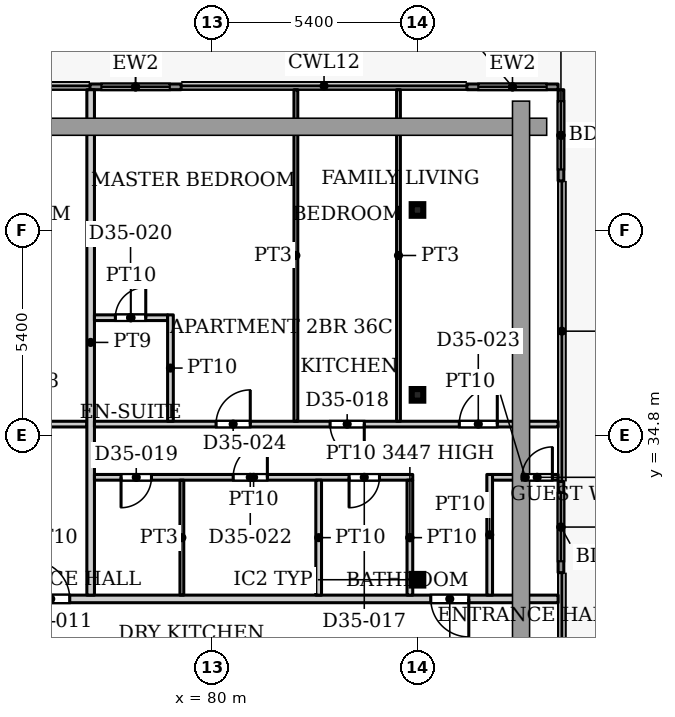
"""IFC4 building model, lengths in metres.
Left out: names, types, materials, properties, quantities, classifications, styles, units other than length and angle.
Written with IfcOpenShell. Run it as: python <this file> out.ifc"""

import sys

from ifc_helpers import new_model, si_unit, direction, frame, frame_2d, origin, origin_2d, place, context, subcontext, project, spatial, rectangle, hollow_rectangle, extrude, source, transform, mapped, element, fill, save


model = new_model("IFC4")
c1 = context("Model", 3, precision=1e-05, world=origin(), true_north=direction((0.0, 1.0)))
c2 = subcontext(c1, "Body", "Model", "MODEL_VIEW")
j1 = project(units=[si_unit("LENGTHUNIT", "METRE"), si_unit("PLANEANGLEUNIT", "RADIAN")], contexts=[c1])
p1 = place(None, origin())
s1 = spatial("IfcSite", under=j1, at=p1, CompositionType="ELEMENT")
p2 = place(p1, origin())
s2 = spatial("IfcBuilding", under=s1, at=p2, CompositionType="ELEMENT")
p3 = place(p2, frame((0.0, 0.0, 156.5)))
s3 = spatial("IfcBuildingStorey", under=s2, at=p3, CompositionType="ELEMENT", Elevation=156.5)
for number, where, z_axis, x_axis in (
    (1, (85.4, 31.005, 0.0), (0.0, 0.0, 1.0), (1.0, 0.0, 0.0)),
    (2, (85.4, 35.87, 0.0), (0.0, 0.0, 1.0), (1.0, 0.0, 0.0)),
    (3, (85.4, 40.735, 0.0), (0.0, 0.0, 1.0), (1.0, 0.0, 0.0)),
):
    element("IfcColumn", number, at=place(p3, frame(where, z_axis=z_axis, x_axis=x_axis)), inside=s3, PredefinedType="COLUMN", context=c2, shape_type="SweptSolid", body=[
        extrude(hollow_rectangle(XDim=0.305, YDim=0.305, WallThickness=0.016, InnerFilletRadius=0.016, OuterFilletRadius=0.032, at=origin_2d()), origin(), (0.0, 0.0, 1.0), 3.9),
    ])
p4 = place(p3, frame((76.782, 43.975, 0.0), z_axis=(0.0, 0.0, 1.0), x_axis=(1.0, 0.0, 0.0)))
e4 = element("IfcWall", 4, at=p4, inside=s3, PredefinedType="SOLIDWALL", context=c2, shape_type="SweptSolid", body=[
    extrude(rectangle(XDim=2.4, YDim=0.15, at=frame_2d((1.2, 0.0))), origin(), (0.0, 0.0, 1.0), 3.75),
])
p5 = place(p4, frame((0.3, 0.0, 0.0)))
e5 = element("IfcOpeningElement", 5, at=p5, cuts=e4, PredefinedType="OPENING", context=c2, shape_type="SweptSolid", body=[
    extrude(rectangle(XDim=1.8, YDim=2.4, at=frame_2d((0.9, 1.2))), frame((0.0, 0.085, 0.0), z_axis=(0.0, -1.0, 0.0), x_axis=(1.0, 0.0, 0.0)), (0.0, 0.0, 1.0), 0.17),
])
p6 = place(p3, frame((86.7, 43.975, 0.0), z_axis=(0.0, 0.0, 1.0), x_axis=(1.0, 0.0, 0.0)))
e6 = element("IfcWall", 6, at=p6, inside=s3, PredefinedType="SOLIDWALL", context=c2, shape_type="SweptSolid", body=[
    extrude(rectangle(XDim=2.4, YDim=0.15, at=frame_2d((1.2, 0.0))), origin(), (0.0, 0.0, 1.0), 3.75),
])
p7 = place(p6, frame((0.3, 0.0, 0.0)))
e7 = element("IfcOpeningElement", 7, at=p7, cuts=e6, PredefinedType="OPENING", context=c2, shape_type="SweptSolid", body=[
    extrude(rectangle(XDim=1.8, YDim=2.4, at=frame_2d((0.9, 1.2))), frame((0.0, 0.085, 0.0), z_axis=(0.0, -1.0, 0.0), x_axis=(1.0, 0.0, 0.0)), (0.0, 0.0, 1.0), 0.17),
])
p8 = place(p3, frame((89.175, 43.9, 0.0), z_axis=(0.0, 0.0, 1.0), x_axis=(0.0, -1.0, 0.0)))
e8 = element("IfcWall", 8, at=p8, inside=s3, PredefinedType="SOLIDWALL", context=c2, shape_type="SweptSolid", body=[
    extrude(rectangle(XDim=2.4, YDim=0.15, at=frame_2d((1.2, 0.0))), origin(), (0.0, 0.0, 1.0), 3.75),
])
p9 = place(p8, frame((0.3, 0.0, 0.0)))
e9 = element("IfcOpeningElement", 9, at=p9, cuts=e8, PredefinedType="OPENING", context=c2, shape_type="SweptSolid", body=[
    extrude(rectangle(XDim=1.8, YDim=2.4, at=frame_2d((0.9, 1.2))), frame((0.0, 0.085, 0.0), z_axis=(0.0, -1.0, 0.0), x_axis=(1.0, 0.0, 0.0)), (0.0, 0.0, 1.0), 0.17),
])
p10 = place(p3, frame((89.175, 33.591, 0.0), z_axis=(0.0, 0.0, 1.0), x_axis=(0.0, -1.0, 0.0)))
e10 = element("IfcWall", 10, at=p10, inside=s3, PredefinedType="SOLIDWALL", context=c2, shape_type="SweptSolid", body=[
    extrude(rectangle(XDim=2.4, YDim=0.15, at=frame_2d((1.2, 0.0))), origin(), (0.0, 0.0, 1.0), 3.75),
])
p11 = place(p10, frame((0.3, 0.0, 0.0)))
e11 = element("IfcOpeningElement", 11, at=p11, cuts=e10, PredefinedType="OPENING", context=c2, shape_type="SweptSolid", body=[
    extrude(rectangle(XDim=1.8, YDim=2.4, at=frame_2d((0.9, 1.2))), frame((0.0, 0.085, 0.0), z_axis=(0.0, -1.0, 0.0), x_axis=(1.0, 0.0, 0.0)), (0.0, 0.0, 1.0), 0.17),
])
p12 = place(p3, frame((53.549, 30.5, 0.0), z_axis=(0.0, 0.0, 1.0), x_axis=(1.0, 0.0, 0.0)))
e12 = element("IfcWall", 12, at=p12, inside=s3, PredefinedType="PARTITIONING", context=c2, shape_type="SweptSolid", body=[
    extrude(rectangle(XDim=35.551, YDim=0.2, at=frame_2d((17.775, 0.0))), origin(), (0.0, 0.0, 1.0), 3.6),
])
p13 = place(p12, frame((0.251, 0.0, 0.0)))
e13 = element("IfcOpeningElement", 13, at=p13, cuts=e12, PredefinedType="OPENING", context=c2, shape_type="SweptSolid", body=[
    extrude(rectangle(XDim=1.0, YDim=2.1, at=frame_2d((0.5, 1.05))), frame((0.0, 0.11, 0.0), z_axis=(0.0, -1.0, 0.0), x_axis=(1.0, 0.0, 0.0)), (0.0, 0.0, 1.0), 0.22),
])
p14 = place(p12, frame((21.701, 0.0, 0.0)))
e14 = element("IfcOpeningElement", 14, at=p14, cuts=e12, PredefinedType="OPENING", context=c2, shape_type="SweptSolid", body=[
    extrude(rectangle(XDim=1.0, YDim=2.1, at=frame_2d((0.5, 1.05))), frame((0.0, 0.11, 0.0), z_axis=(0.0, -1.0, 0.0), x_axis=(1.0, 0.0, 0.0)), (0.0, 0.0, 1.0), 0.22),
])
p15 = place(p12, frame((32.201, 0.0, 0.0)))
e15 = element("IfcOpeningElement", 15, at=p15, cuts=e12, PredefinedType="OPENING", context=c2, shape_type="SweptSolid", body=[
    extrude(rectangle(XDim=1.0, YDim=2.1, at=frame_2d((0.5, 1.05))), frame((0.0, 0.11, 0.0), z_axis=(0.0, -1.0, 0.0), x_axis=(1.0, 0.0, 0.0)), (0.0, 0.0, 1.0), 0.22),
])
p16 = place(p3, frame((62.8, 35.1, 0.0), z_axis=(0.0, 0.0, 1.0), x_axis=(1.0, 0.0, 0.0)))
e16 = element("IfcWall", 16, at=p16, inside=s3, PredefinedType="PARTITIONING", context=c2, shape_type="SweptSolid", body=[
    extrude(rectangle(XDim=13.9, YDim=0.15, at=frame_2d((6.95, 0.0))), origin(), (0.0, 0.0, 1.0), 3.6),
])
p17 = place(p16, frame((11.6, 0.0, 0.0)))
e17 = element("IfcOpeningElement", 17, at=p17, cuts=e16, PredefinedType="OPENING", context=c2, shape_type="SweptSolid", body=[
    extrude(rectangle(XDim=0.9, YDim=2.1, at=frame_2d((0.45, 1.05))), frame((0.0, 0.085, 0.0), z_axis=(0.0, -1.0, 0.0), x_axis=(1.0, 0.0, 0.0)), (0.0, 0.0, 1.0), 0.17),
])
p18 = place(p16, frame((1.8, 0.0, 0.0)))
e18 = element("IfcOpeningElement", 18, at=p18, cuts=e16, PredefinedType="OPENING", context=c2, shape_type="SweptSolid", body=[
    extrude(rectangle(XDim=1.0, YDim=2.1, at=frame_2d((0.5, 1.05))), frame((0.0, 0.085, 0.0), z_axis=(0.0, -1.0, 0.0), x_axis=(1.0, 0.0, 0.0)), (0.0, 0.0, 1.0), 0.17),
])
p19 = place(p16, frame((5.5, 0.0, 0.0)))
e19 = element("IfcOpeningElement", 19, at=p19, cuts=e16, PredefinedType="OPENING", context=c2, shape_type="SweptSolid", body=[
    extrude(rectangle(XDim=0.9, YDim=2.1, at=frame_2d((0.45, 1.05))), frame((0.0, 0.085, 0.0), z_axis=(0.0, -1.0, 0.0), x_axis=(1.0, 0.0, 0.0)), (0.0, 0.0, 1.0), 0.17),
])
p20 = place(p3, frame((76.8, 30.6, 0.0), z_axis=(0.0, 0.0, 1.0), x_axis=(0.0, 1.0, 0.0)))
e20 = element("IfcWall", 20, at=p20, inside=s3, PredefinedType="PARTITIONING", context=c2, shape_type="SweptSolid", body=[
    extrude(rectangle(XDim=13.3, YDim=0.2, at=frame_2d((6.65, 0.0))), origin(), (0.0, 0.0, 1.0), 3.6),
])
p21 = place(p3, frame((76.9, 33.7, 0.0), z_axis=(0.0, 0.0, 1.0), x_axis=(1.0, 0.0, 0.0)))
e21 = element("IfcWall", 21, at=p21, inside=s3, PredefinedType="PARTITIONING", context=c2, shape_type="SweptSolid", body=[
    extrude(rectangle(XDim=8.375, YDim=0.15, at=frame_2d((4.188, 0.0))), origin(), (0.0, 0.0, 1.0), 3.6),
])
p22 = place(p21, frame((6.7, 0.0, 0.0)))
e22 = element("IfcOpeningElement", 22, at=p22, cuts=e21, PredefinedType="OPENING", context=c2, shape_type="SweptSolid", body=[
    extrude(rectangle(XDim=0.8, YDim=2.1, at=frame_2d((0.4, 1.05))), frame((0.0, 0.085, 0.0), z_axis=(0.0, -1.0, 0.0), x_axis=(1.0, 0.0, 0.0)), (0.0, 0.0, 1.0), 0.17),
])
p23 = place(p21, frame((0.7, 0.0, 0.0)))
e23 = element("IfcOpeningElement", 23, at=p23, cuts=e21, PredefinedType="OPENING", context=c2, shape_type="SweptSolid", body=[
    extrude(rectangle(XDim=0.8, YDim=2.1, at=frame_2d((0.4, 1.05))), frame((0.0, 0.085, 0.0), z_axis=(0.0, -1.0, 0.0), x_axis=(1.0, 0.0, 0.0)), (0.0, 0.0, 1.0), 0.17),
])
p24 = place(p21, frame((3.65, 0.0, 0.0)))
e24 = element("IfcOpeningElement", 24, at=p24, cuts=e21, PredefinedType="OPENING", context=c2, shape_type="SweptSolid", body=[
    extrude(rectangle(XDim=0.9, YDim=2.1, at=frame_2d((0.45, 1.05))), frame((0.0, 0.085, 0.0), z_axis=(0.0, -1.0, 0.0), x_axis=(1.0, 0.0, 0.0)), (0.0, 0.0, 1.0), 0.17),
])
p25 = place(p3, frame((76.9, 35.1, 0.0), z_axis=(0.0, 0.0, 1.0), x_axis=(1.0, 0.0, 0.0)))
e25 = element("IfcWall", 25, at=p25, inside=s3, PredefinedType="PARTITIONING", context=c2, shape_type="SweptSolid", body=[
    extrude(rectangle(XDim=12.2, YDim=0.15, at=frame_2d((6.1, 0.0))), origin(), (0.0, 0.0, 1.0), 3.6),
])
p26 = place(p25, frame((6.2, 0.0, 0.0)))
e26 = element("IfcOpeningElement", 26, at=p26, cuts=e25, PredefinedType="OPENING", context=c2, shape_type="SweptSolid", body=[
    extrude(rectangle(XDim=0.9, YDim=2.1, at=frame_2d((0.45, 1.05))), frame((0.0, 0.085, 0.0), z_axis=(0.0, -1.0, 0.0), x_axis=(1.0, 0.0, 0.0)), (0.0, 0.0, 1.0), 0.17),
])
p27 = place(p25, frame((9.6, 0.0, 0.0)))
e27 = element("IfcOpeningElement", 27, at=p27, cuts=e25, PredefinedType="OPENING", context=c2, shape_type="SweptSolid", body=[
    extrude(rectangle(XDim=1.0, YDim=2.1, at=frame_2d((0.5, 1.05))), frame((0.0, 0.085, 0.0), z_axis=(0.0, -1.0, 0.0), x_axis=(1.0, 0.0, 0.0)), (0.0, 0.0, 1.0), 0.17),
])
p28 = place(p25, frame((3.2, 0.0, 0.0)))
e28 = element("IfcOpeningElement", 28, at=p28, cuts=e25, PredefinedType="OPENING", context=c2, shape_type="SweptSolid", body=[
    extrude(rectangle(XDim=0.9, YDim=2.1, at=frame_2d((0.45, 1.05))), frame((0.0, 0.085, 0.0), z_axis=(0.0, -1.0, 0.0), x_axis=(1.0, 0.0, 0.0)), (0.0, 0.0, 1.0), 0.17),
])
p29 = place(p3, frame((76.9, 37.9, 0.0), z_axis=(0.0, 0.0, 1.0), x_axis=(1.0, 0.0, 0.0)))
e29 = element("IfcWall", 29, at=p29, inside=s3, PredefinedType="PARTITIONING", context=c2, shape_type="SweptSolid", body=[
    extrude(rectangle(XDim=1.925, YDim=0.15, at=frame_2d((0.962, 0.0))), origin(), (0.0, 0.0, 1.0), 3.6),
])
p30 = place(p29, frame((0.55, 0.0, 0.0)))
e30 = element("IfcOpeningElement", 30, at=p30, cuts=e29, PredefinedType="OPENING", context=c2, shape_type="SweptSolid", body=[
    extrude(rectangle(XDim=0.8, YDim=2.1, at=frame_2d((0.4, 1.05))), frame((0.0, 0.085, 0.0), z_axis=(0.0, -1.0, 0.0), x_axis=(1.0, 0.0, 0.0)), (0.0, 0.0, 1.0), 0.17),
])
p31 = place(p3, frame((78.9, 35.175, 0.0), z_axis=(0.0, 0.0, 1.0), x_axis=(0.0, 1.0, 0.0)))
e31 = element("IfcWall", 31, at=p31, inside=s3, PredefinedType="PARTITIONING", context=c2, shape_type="SweptSolid", body=[
    extrude(rectangle(XDim=2.8, YDim=0.15, at=frame_2d((1.4, 0.0))), origin(), (0.0, 0.0, 1.0), 3.6),
])
p32 = place(p3, frame((79.2, 30.6, 0.0), z_axis=(0.0, 0.0, 1.0), x_axis=(0.0, 1.0, 0.0)))
e32 = element("IfcWall", 32, at=p32, inside=s3, PredefinedType="PARTITIONING", context=c2, shape_type="SweptSolid", body=[
    extrude(rectangle(XDim=3.025, YDim=0.1, at=frame_2d((1.512, 0.0))), origin(), (0.0, 0.0, 1.0), 3.6),
])
p33 = place(p3, frame((82.2, 35.175, 0.0), z_axis=(0.0, 0.0, 1.0), x_axis=(0.0, 1.0, 0.0)))
e33 = element("IfcWall", 33, at=p33, inside=s3, PredefinedType="PARTITIONING", context=c2, shape_type="SweptSolid", body=[
    extrude(rectangle(XDim=8.725, YDim=0.1, at=frame_2d((4.362, 0.0))), origin(), (0.0, 0.0, 1.0), 3.6),
])
p34 = place(p3, frame((82.8, 30.6, 0.0), z_axis=(0.0, 0.0, 1.0), x_axis=(0.0, 1.0, 0.0)))
e34 = element("IfcWall", 34, at=p34, inside=s3, PredefinedType="PARTITIONING", context=c2, shape_type="SweptSolid", body=[
    extrude(rectangle(XDim=3.025, YDim=0.15, at=frame_2d((1.512, 0.0))), origin(), (0.0, 0.0, 1.0), 3.6),
])
p35 = place(p3, frame((84.9, 35.175, 0.0), z_axis=(0.0, 0.0, 1.0), x_axis=(0.0, 1.0, 0.0)))
e35 = element("IfcWall", 35, at=p35, inside=s3, PredefinedType="PARTITIONING", context=c2, shape_type="SweptSolid", body=[
    extrude(rectangle(XDim=8.725, YDim=0.1, at=frame_2d((4.362, 0.0))), origin(), (0.0, 0.0, 1.0), 3.6),
])
p36 = place(p3, frame((85.2, 30.6, 0.0), z_axis=(0.0, 0.0, 1.0), x_axis=(0.0, 1.0, 0.0)))
e36 = element("IfcWall", 36, at=p36, inside=s3, PredefinedType="PARTITIONING", context=c2, shape_type="SweptSolid", body=[
    extrude(rectangle(XDim=3.025, YDim=0.15, at=frame_2d((1.512, 0.0))), origin(), (0.0, 0.0, 1.0), 3.447),
])
p37 = place(p3, frame((87.3, 30.6, 0.0), z_axis=(0.0, 0.0, 1.0), x_axis=(0.0, 1.0, 0.0)))
e37 = element("IfcWall", 37, at=p37, inside=s3, PredefinedType="PARTITIONING", context=c2, shape_type="SweptSolid", body=[
    extrude(rectangle(XDim=3.175, YDim=0.15, at=frame_2d((1.587, 0.0))), origin(), (0.0, 0.0, 1.0), 3.6),
])
p38 = place(p3, frame((87.375, 33.7, 0.0), z_axis=(0.0, 0.0, 1.0), x_axis=(1.0, 0.0, 0.0)))
e38 = element("IfcWall", 38, at=p38, inside=s3, PredefinedType="PARTITIONING", context=c2, shape_type="SweptSolid", body=[
    extrude(rectangle(XDim=1.725, YDim=0.15, at=frame_2d((0.863, 0.0))), origin(), (0.0, 0.0, 1.0), 3.6),
])
p39 = place(p38, frame((0.775, 0.0, 0.0)))
e39 = element("IfcOpeningElement", 39, at=p39, cuts=e38, PredefinedType="OPENING", context=c2, shape_type="SweptSolid", body=[
    extrude(rectangle(XDim=0.8, YDim=2.1, at=frame_2d((0.4, 1.05))), frame((0.0, 0.085, 0.0), z_axis=(0.0, -1.0, 0.0), x_axis=(1.0, 0.0, 0.0)), (0.0, 0.0, 1.0), 0.17),
])
m1 = source(origin(), c2, "Body", "SweptSolid", [
    extrude(rectangle(XDim=1.8, YDim=2.4, at=frame_2d((0.9, 1.2))), frame((0.0, 0.025, 0.0), z_axis=(0.0, -1.0, 0.0), x_axis=(1.0, 0.0, 0.0)), (0.0, 0.0, 1.0), 0.05),
])
p40 = place(p5, origin())
e40 = element("IfcDoor", 40, at=p40, inside=s3, OperationType="SLIDING_TO_LEFT", PredefinedType="DOOR", context=c2, shape_type="MappedRepresentation", body=[
    mapped(m1, transform((0.0, 0.0, 0.0), x_axis=(1.0, 0.0, 0.0), y_axis=(0.0, 1.0, 0.0), z_axis=(0.0, 0.0, 1.0), scale=1.0)),
])
fill(e5, e40)
p41 = place(p7, origin())
e41 = element("IfcDoor", 41, at=p41, inside=s3, OperationType="SLIDING_TO_LEFT", PredefinedType="DOOR", context=c2, shape_type="MappedRepresentation", body=[
    mapped(m1, transform((0.0, 0.0, 0.0), x_axis=(1.0, 0.0, 0.0), y_axis=(0.0, 1.0, 0.0), z_axis=(0.0, 0.0, 1.0), scale=1.0)),
])
fill(e7, e41)
p42 = place(p9, origin())
e42 = element("IfcDoor", 42, at=p42, inside=s3, OperationType="SLIDING_TO_LEFT", PredefinedType="DOOR", context=c2, shape_type="MappedRepresentation", body=[
    mapped(m1, transform((0.0, 0.0, 0.0), x_axis=(1.0, 0.0, 0.0), y_axis=(0.0, 1.0, 0.0), z_axis=(0.0, 0.0, 1.0), scale=1.0)),
])
fill(e9, e42)
p43 = place(p11, origin())
e43 = element("IfcDoor", 43, at=p43, inside=s3, OperationType="SLIDING_TO_LEFT", PredefinedType="DOOR", context=c2, shape_type="MappedRepresentation", body=[
    mapped(m1, transform((0.0, 0.0, 0.0), x_axis=(1.0, 0.0, 0.0), y_axis=(0.0, 1.0, 0.0), z_axis=(0.0, 0.0, 1.0), scale=1.0)),
])
fill(e11, e43)
m2 = source(origin(), c2, "Body", "SweptSolid", [
    extrude(rectangle(XDim=1.0, YDim=2.1, at=frame_2d((0.5, 1.05))), frame((0.0, 0.025, 0.0), z_axis=(0.0, -1.0, 0.0), x_axis=(1.0, 0.0, 0.0)), (0.0, 0.0, 1.0), 0.05),
])
p44 = place(p14, origin())
e44 = element("IfcDoor", 44, at=p44, inside=s3, OperationType="SINGLE_SWING_LEFT", PredefinedType="DOOR", context=c2, shape_type="MappedRepresentation", body=[
    mapped(m2, transform((0.0, 0.0, 0.0), x_axis=(1.0, 0.0, 0.0), y_axis=(0.0, 1.0, 0.0), z_axis=(0.0, 0.0, 1.0), scale=1.0)),
])
fill(e14, e44)
m3 = source(origin(), c2, "Body", "SweptSolid", [
    extrude(rectangle(XDim=0.8, YDim=2.1, at=frame_2d((0.4, 1.05))), frame((0.0, 0.025, 0.0), z_axis=(0.0, -1.0, 0.0), x_axis=(1.0, 0.0, 0.0)), (0.0, 0.0, 1.0), 0.05),
])
p45 = place(p22, origin())
e45 = element("IfcDoor", 45, at=p45, inside=s3, OperationType="SINGLE_SWING_RIGHT", PredefinedType="DOOR", context=c2, shape_type="MappedRepresentation", body=[
    mapped(m3, transform((0.0, 0.0, 0.0), x_axis=(1.0, 0.0, 0.0), y_axis=(0.0, 1.0, 0.0), z_axis=(0.0, 0.0, 1.0), scale=1.0)),
])
fill(e22, e45)
m4 = source(origin(), c2, "Body", "SweptSolid", [
    extrude(rectangle(XDim=0.9, YDim=2.1, at=frame_2d((0.45, 1.05))), frame((0.0, 0.025, 0.0), z_axis=(0.0, -1.0, 0.0), x_axis=(1.0, 0.0, 0.0)), (0.0, 0.0, 1.0), 0.05),
])
p46 = place(p26, origin())
e46 = element("IfcDoor", 46, at=p46, inside=s3, OperationType="SINGLE_SWING_RIGHT", PredefinedType="DOOR", context=c2, shape_type="MappedRepresentation", body=[
    mapped(m4, transform((0.0, 0.0, 0.0), x_axis=(1.0, 0.0, 0.0), y_axis=(0.0, 1.0, 0.0), z_axis=(0.0, 0.0, 1.0), scale=1.0)),
])
fill(e26, e46)
p47 = place(p23, origin())
e47 = element("IfcDoor", 47, at=p47, inside=s3, OperationType="SINGLE_SWING_RIGHT", PredefinedType="DOOR", context=c2, shape_type="MappedRepresentation", body=[
    mapped(m3, transform((0.0, 0.0, 0.0), x_axis=(1.0, 0.0, 0.0), y_axis=(0.0, 1.0, 0.0), z_axis=(0.0, 0.0, 1.0), scale=1.0)),
])
fill(e23, e47)
p48 = place(p30, origin())
e48 = element("IfcDoor", 48, at=p48, inside=s3, OperationType="SINGLE_SWING_LEFT", PredefinedType="DOOR", context=c2, shape_type="MappedRepresentation", body=[
    mapped(m3, transform((0.0, 0.0, 0.0), x_axis=(1.0, 0.0, 0.0), y_axis=(0.0, 1.0, 0.0), z_axis=(0.0, 0.0, 1.0), scale=1.0)),
])
fill(e30, e48)
p49 = place(p15, origin())
e49 = element("IfcDoor", 49, at=p49, inside=s3, OperationType="SINGLE_SWING_RIGHT", PredefinedType="DOOR", context=c2, shape_type="MappedRepresentation", body=[
    mapped(m2, transform((0.0, 0.0, 0.0), x_axis=(1.0, 0.0, 0.0), y_axis=(0.0, 1.0, 0.0), z_axis=(0.0, 0.0, 1.0), scale=1.0)),
])
fill(e15, e49)
p50 = place(p24, origin())
e50 = element("IfcDoor", 50, at=p50, inside=s3, OperationType="SINGLE_SWING_LEFT", PredefinedType="DOOR", context=c2, shape_type="MappedRepresentation", body=[
    mapped(m4, transform((0.0, 0.0, 0.0), x_axis=(1.0, 0.0, 0.0), y_axis=(0.0, 1.0, 0.0), z_axis=(0.0, 0.0, 1.0), scale=1.0)),
])
fill(e24, e50)
m5 = source(origin(), c2, "Body", "SweptSolid", [
    extrude(rectangle(XDim=1.0, YDim=2.1, at=frame_2d((0.5, 1.05))), frame((0.0, 0.025, 0.0), z_axis=(0.0, -1.0, 0.0), x_axis=(1.0, 0.0, 0.0)), (0.0, 0.0, 1.0), 0.05),
])
p51 = place(p27, origin())
e51 = element("IfcDoor", 51, at=p51, inside=s3, OperationType="SINGLE_SWING_LEFT", PredefinedType="DOOR", context=c2, shape_type="MappedRepresentation", body=[
    mapped(m5, transform((0.0, 0.0, 0.0), x_axis=(1.0, 0.0, 0.0), y_axis=(0.0, 1.0, 0.0), z_axis=(0.0, 0.0, 1.0), scale=1.0)),
])
fill(e27, e51)
p52 = place(p28, origin())
e52 = element("IfcDoor", 52, at=p52, inside=s3, OperationType="SINGLE_SWING_LEFT", PredefinedType="DOOR", context=c2, shape_type="MappedRepresentation", body=[
    mapped(m4, transform((0.0, 0.0, 0.0), x_axis=(1.0, 0.0, 0.0), y_axis=(0.0, 1.0, 0.0), z_axis=(0.0, 0.0, 1.0), scale=1.0)),
])
fill(e28, e52)
p53 = place(p39, origin())
e53 = element("IfcDoor", 53, at=p53, inside=s3, OperationType="SINGLE_SWING_LEFT", PredefinedType="DOOR", context=c2, shape_type="MappedRepresentation", body=[
    mapped(m3, transform((0.0, 0.0, 0.0), x_axis=(1.0, 0.0, 0.0), y_axis=(0.0, 1.0, 0.0), z_axis=(0.0, 0.0, 1.0), scale=1.0)),
])
fill(e39, e53)
save(model, sys.argv[1])
